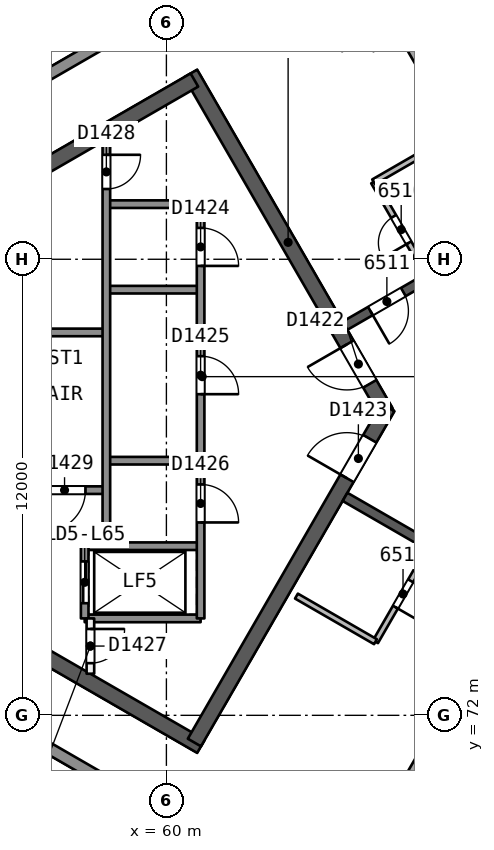
"""IFC4 building model, lengths in metres.
Left out: names, types, materials, properties, quantities, classifications, styles, units other than length and angle.
Written with IfcOpenShell. Run it as: python <this file> out.ifc"""

import sys

from ifc_helpers import new_model, si_unit, direction, frame, frame_2d, origin, place, context, subcontext, project, spatial, rectangle, extrude, element, fill, save


model = new_model("IFC4")
c1 = context("Model", 3, precision=1e-05, world=origin(), true_north=direction((0.0, 1.0)))
c2 = subcontext(c1, "Body", "Model", "MODEL_VIEW")
j1 = project(units=[si_unit("LENGTHUNIT", "METRE"), si_unit("PLANEANGLEUNIT", "RADIAN")], contexts=[c1])
p1 = place(None, origin())
s1 = spatial("IfcSite", under=j1, at=p1, CompositionType="ELEMENT")
p2 = place(p1, origin())
s2 = spatial("IfcBuilding", under=s1, at=p2, CompositionType="ELEMENT")
p3 = place(p2, frame((0.0, 0.0, 266.4)))
s3 = spatial("IfcBuildingStorey", under=s2, at=p3, CompositionType="ELEMENT", Elevation=266.4)
p4 = place(p3, frame((65.769, 80.0, 0.0), z_axis=(0.0, 0.0, 1.0), x_axis=(-0.50000177223, 0.866024380585, 0.0)))
e1 = element("IfcWall", 1, at=p4, inside=s3, PredefinedType="SHEAR", context=c2, shape_type="SweptSolid", body=[
    extrude(rectangle(XDim=10.265, YDim=0.4, at=frame_2d((5.132, 0.0))), origin(), (0.0, 0.0, 1.0), 3.7),
])
p5 = place(p4, frame((0.834, 0.0, 0.0)))
e2 = element("IfcOpeningElement", 2, at=p5, cuts=e1, PredefinedType="OPENING", context=c2, shape_type="SweptSolid", body=[
    extrude(rectangle(XDim=1.2, YDim=2.1, at=frame_2d((0.6, 1.05))), frame((0.0, 0.21, 0.0), z_axis=(0.0, -1.0, 0.0), x_axis=(1.0, 0.0, 0.0)), (0.0, 0.0, 1.0), 0.421),
])
p6 = place(p3, frame((60.737, 88.716, 0.0), z_axis=(0.0, 0.0, 1.0), x_axis=(-0.866028812667, -0.499994095595, 0.0)))
e3 = element("IfcWall", 3, at=p6, inside=s3, PredefinedType="SHEAR", context=c2, shape_type="SweptSolid", body=[
    extrude(rectangle(XDim=14.134, YDim=0.4, at=frame_2d((7.067, 0.0))), origin(), (0.0, 0.0, 1.0), 3.7),
])
p7 = place(p3, frame((48.597, 78.293, 0.0), z_axis=(0.0, 0.0, 1.0), x_axis=(0.866026024469, -0.499998924941, 0.0)))
e4 = element("IfcWall", 4, at=p7, inside=s3, PredefinedType="SHEAR", context=c2, shape_type="SweptSolid", body=[
    extrude(rectangle(XDim=14.218, YDim=0.4, at=frame_2d((7.109, 0.0))), origin(), (0.0, 0.0, 1.0), 3.7),
])
p8 = place(p3, frame((60.737, 71.284, 0.0), z_axis=(0.0, 0.0, 1.0), x_axis=(0.50000547566, 0.866022242388, 0.0)))
e5 = element("IfcWall", 5, at=p8, inside=s3, PredefinedType="SHEAR", context=c2, shape_type="SweptSolid", body=[
    extrude(rectangle(XDim=10.18, YDim=0.4, at=frame_2d((5.09, 0.0))), origin(), (0.0, 0.0, 1.0), 3.7),
])
p9 = place(p8, frame((8.03, 0.0, 0.0)))
e6 = element("IfcOpeningElement", 6, at=p9, cuts=e5, PredefinedType="OPENING", context=c2, shape_type="SweptSolid", body=[
    extrude(rectangle(XDim=1.2, YDim=2.1, at=frame_2d((0.6, 1.05))), frame((0.0, 0.21, 0.0), z_axis=(0.0, -1.0, 0.0), x_axis=(1.0, 0.0, 0.0)), (0.0, 0.0, 1.0), 0.421),
])
p10 = place(p3, frame((78.2, 90.046, 0.0), z_axis=(0.0, 0.0, 1.0), x_axis=(-0.866026492143, -0.499998114903, 0.0)))
e7 = element("IfcWall", 7, at=p10, inside=s3, PredefinedType="SHEAR", context=c2, shape_type="SweptSolid", body=[
    extrude(rectangle(XDim=15.588, YDim=0.25, at=frame_2d((7.794, 0.0))), origin(), (0.0, 0.0, 1.0), 3.3),
])
p11 = place(p10, frame((7.072, 0.0, 0.0)))
e8 = element("IfcOpeningElement", 8, at=p11, cuts=e7, PredefinedType="OPENING", context=c2, shape_type="SweptSolid", body=[
    extrude(rectangle(XDim=1.0, YDim=2.1, at=frame_2d((0.5, 1.05))), frame((0.0, 0.135, 0.0), z_axis=(0.0, -1.0, 0.0), x_axis=(1.0, 0.0, 0.0)), (0.0, 0.0, 1.0), 0.271),
])
p12 = place(p10, frame((13.816, 0.0, 0.0)))
e9 = element("IfcOpeningElement", 9, at=p12, cuts=e7, PredefinedType="OPENING", context=c2, shape_type="SweptSolid", body=[
    extrude(rectangle(XDim=1.0, YDim=2.1, at=frame_2d((0.5, 1.05))), frame((0.0, 0.135, 0.0), z_axis=(0.0, -1.0, 0.0), x_axis=(1.0, 0.0, 0.0)), (0.0, 0.0, 1.0), 0.271),
])
p13 = place(p3, frame((64.7, 77.748, 0.0), z_axis=(0.0, 0.0, 1.0), x_axis=(0.866026492143, -0.499998114903, 0.0)))
e10 = element("IfcWall", 10, at=p13, inside=s3, PredefinedType="SHEAR", context=c2, shape_type="SweptSolid", body=[
    extrude(rectangle(XDim=15.588, YDim=0.25, at=frame_2d((7.794, 0.0))), origin(), (0.0, 0.0, 1.0), 3.3),
])
p14 = place(p13, frame((3.372, 0.0, 0.0)))
e11 = element("IfcOpeningElement", 11, at=p14, cuts=e10, PredefinedType="OPENING", context=c2, shape_type="SweptSolid", body=[
    extrude(rectangle(XDim=1.0, YDim=2.1, at=frame_2d((0.5, 1.05))), frame((0.0, 0.135, 0.0), z_axis=(0.0, -1.0, 0.0), x_axis=(1.0, 0.0, 0.0)), (0.0, 0.0, 1.0), 0.271),
])
p15 = place(p13, frame((12.216, 0.0, 0.0)))
e12 = element("IfcOpeningElement", 12, at=p15, cuts=e10, PredefinedType="OPENING", context=c2, shape_type="SweptSolid", body=[
    extrude(rectangle(XDim=1.0, YDim=2.1, at=frame_2d((0.5, 1.05))), frame((0.0, 0.135, 0.0), z_axis=(0.0, -1.0, 0.0), x_axis=(1.0, 0.0, 0.0)), (0.0, 0.0, 1.0), 0.271),
])
p16 = place(p3, frame((64.416, 93.032, 0.0), z_axis=(0.0, 0.0, 1.0), x_axis=(0.500006360488, -0.866021731524, 0.0)))
e13 = element("IfcWall", 13, at=p16, inside=s3, PredefinedType="PARTITIONING", context=c2, shape_type="SweptSolid", body=[
    extrude(rectangle(XDim=9.479, YDim=0.2, at=frame_2d((4.739, 0.0))), origin(), (0.0, 0.0, 1.0), 3.3),
])
p17 = place(p3, frame((66.903, 83.524, 0.0), z_axis=(0.0, 0.0, 1.0), x_axis=(-0.499987231761, 0.866032775405, 0.0)))
e14 = element("IfcWall", 14, at=p17, inside=s3, PredefinedType="PARTITIONING", context=c2, shape_type="SweptSolid", body=[
    extrude(rectangle(XDim=2.9, YDim=0.15, at=frame_2d((1.45, 0.0))), origin(), (0.0, 0.0, 1.0), 3.3),
])
p18 = place(p17, frame((1.05, 0.0, 0.0)))
e15 = element("IfcOpeningElement", 15, at=p18, cuts=e14, PredefinedType="OPENING", context=c2, shape_type="SweptSolid", body=[
    extrude(rectangle(XDim=0.8, YDim=2.1, at=frame_2d((0.4, 1.05))), frame((0.0, 0.085, 0.0), z_axis=(0.0, -1.0, 0.0), x_axis=(1.0, 0.0, 0.0)), (0.0, 0.0, 1.0), 0.171),
])
p19 = place(p3, frame((65.453, 86.035, 0.0), z_axis=(0.0, 0.0, 1.0), x_axis=(0.866021400173, 0.500006934395, 0.0)))
e16 = element("IfcWall", 16, at=p19, inside=s3, PredefinedType="PARTITIONING", context=c2, shape_type="SweptSolid", body=[
    extrude(rectangle(XDim=2.6, YDim=0.15, at=frame_2d((1.3, 0.0))), origin(), (0.0, 0.0, 1.0), 3.3),
])
p20 = place(p3, frame((66.952, 76.448, 0.0), z_axis=(0.0, 0.0, 1.0), x_axis=(-0.499987231761, -0.866032775405, 0.0)))
e17 = element("IfcWall", 17, at=p20, inside=s3, PredefinedType="PARTITIONING", context=c2, shape_type="SweptSolid", body=[
    extrude(rectangle(XDim=2.9, YDim=0.15, at=frame_2d((1.45, 0.0))), origin(), (0.0, 0.0, 1.0), 3.3),
])
p21 = place(p20, frame((1.05, 0.0, 0.0)))
e18 = element("IfcOpeningElement", 18, at=p21, cuts=e17, PredefinedType="OPENING", context=c2, shape_type="SweptSolid", body=[
    extrude(rectangle(XDim=0.8, YDim=2.1, at=frame_2d((0.4, 1.05))), frame((0.0, 0.085, 0.0), z_axis=(0.0, -1.0, 0.0), x_axis=(1.0, 0.0, 0.0)), (0.0, 0.0, 1.0), 0.171),
])
p22 = place(p3, frame((65.502, 73.937, 0.0), z_axis=(0.0, 0.0, 1.0), x_axis=(-0.865994240961, 0.500053971709, 0.0)))
e19 = element("IfcWall", 19, at=p22, inside=s3, PredefinedType="PARTITIONING", context=c2, shape_type="SweptSolid", body=[
    extrude(rectangle(XDim=2.401, YDim=0.15, at=frame_2d((1.201, 0.0))), origin(), (0.0, 0.0, 1.0), 3.3),
])
p23 = place(p3, frame((64.416, 66.968, 0.0), z_axis=(0.0, 0.0, 1.0), x_axis=(0.500014792963, 0.866016862895, 0.0)))
e20 = element("IfcWall", 20, at=p23, inside=s3, PredefinedType="PARTITIONING", context=c2, shape_type="SweptSolid", body=[
    extrude(rectangle(XDim=6.578, YDim=0.2, at=frame_2d((3.289, 0.0))), origin(), (0.0, 0.0, 1.0), 3.3),
])
p24 = place(p3, frame((45.807, 82.46, 0.0), z_axis=(0.0, 0.0, 1.0), x_axis=(0.866024833565, 0.500000987648, 0.0)))
e21 = element("IfcWall", 21, at=p24, inside=s3, PredefinedType="SOLIDWALL", context=c2, shape_type="SweptSolid", body=[
    extrude(rectangle(XDim=48.104, YDim=0.3, at=frame_2d((24.052, 0.0))), origin(), (0.0, 0.0, 1.0), 3.3),
])
p25 = place(p24, frame((28.296, 0.0, 0.0)))
e22 = element("IfcOpeningElement", 22, at=p25, cuts=e21, PredefinedType="OPENING", context=c2, shape_type="SweptSolid", body=[
    extrude(rectangle(XDim=2.4, YDim=2.4, at=frame_2d((1.2, 1.2))), frame((0.0, 0.161, 0.0), z_axis=(0.0, -1.0, 0.0), x_axis=(1.0, 0.0, 0.0)), (0.0, 0.0, 1.0), 0.321),
])
p26 = place(p24, frame((23.074, 0.0, 0.0)))
e23 = element("IfcOpeningElement", 23, at=p26, cuts=e21, PredefinedType="OPENING", context=c2, shape_type="SweptSolid", body=[
    extrude(rectangle(XDim=2.4, YDim=2.4, at=frame_2d((1.2, 1.2))), frame((0.0, 0.161, 0.0), z_axis=(0.0, -1.0, 0.0), x_axis=(1.0, 0.0, 0.0)), (0.0, 0.0, 1.0), 0.321),
])
p27 = place(p24, frame((17.63, 0.0, 0.0)))
e24 = element("IfcOpeningElement", 24, at=p27, cuts=e21, PredefinedType="OPENING", context=c2, shape_type="SweptSolid", body=[
    extrude(rectangle(XDim=2.4, YDim=2.4, at=frame_2d((1.2, 1.2))), frame((0.0, 0.161, 0.0), z_axis=(0.0, -1.0, 0.0), x_axis=(1.0, 0.0, 0.0)), (0.0, 0.0, 1.0), 0.321),
])
p28 = place(p24, frame((39.118, 0.0, 0.9)))
e25 = element("IfcOpeningElement", 25, at=p28, cuts=e21, PredefinedType="OPENING", context=c2, shape_type="SweptSolid", body=[
    extrude(rectangle(XDim=1.8, YDim=1.5, at=frame_2d((0.9, 0.75))), frame((0.0, 0.161, 0.0), z_axis=(0.0, -1.0, 0.0), x_axis=(1.0, 0.0, 0.0)), (0.0, 0.0, 1.0), 0.321),
])
p29 = place(p3, frame((87.466, 53.488, 0.0), z_axis=(0.0, 0.0, 1.0), x_axis=(-0.866024833565, 0.500000987648, 0.0)))
e26 = element("IfcWall", 26, at=p29, inside=s3, PredefinedType="SOLIDWALL", context=c2, shape_type="SweptSolid", body=[
    extrude(rectangle(XDim=48.104, YDim=0.3, at=frame_2d((24.052, 0.0))), origin(), (0.0, 0.0, 1.0), 3.3),
])
p30 = place(p29, frame((23.152, 0.0, 0.0)))
e27 = element("IfcOpeningElement", 27, at=p30, cuts=e26, PredefinedType="OPENING", context=c2, shape_type="SweptSolid", body=[
    extrude(rectangle(XDim=2.4, YDim=2.4, at=frame_2d((1.2, 1.2))), frame((0.0, 0.161, 0.0), z_axis=(0.0, -1.0, 0.0), x_axis=(1.0, 0.0, 0.0)), (0.0, 0.0, 1.0), 0.321),
])
p31 = place(p29, frame((17.93, 0.0, 0.0)))
e28 = element("IfcOpeningElement", 28, at=p31, cuts=e26, PredefinedType="OPENING", context=c2, shape_type="SweptSolid", body=[
    extrude(rectangle(XDim=2.4, YDim=2.4, at=frame_2d((1.2, 1.2))), frame((0.0, 0.161, 0.0), z_axis=(0.0, -1.0, 0.0), x_axis=(1.0, 0.0, 0.0)), (0.0, 0.0, 1.0), 0.321),
])
p32 = place(p29, frame((28.074, 0.0, 0.0)))
e29 = element("IfcOpeningElement", 29, at=p32, cuts=e26, PredefinedType="OPENING", context=c2, shape_type="SweptSolid", body=[
    extrude(rectangle(XDim=2.4, YDim=2.4, at=frame_2d((1.2, 1.2))), frame((0.0, 0.161, 0.0), z_axis=(0.0, -1.0, 0.0), x_axis=(1.0, 0.0, 0.0)), (0.0, 0.0, 1.0), 0.321),
])
for number, where, z_axis, x_axis in (
    (30, (60.9, 85.45, 0.0), (0.0, 0.0, 1.0), (-1.0, 0.0, 0.0)),
    (31, (60.9, 83.2, 0.0), (0.0, 0.0, 1.0), (-1.0, 0.0, 0.0)),
):
    element("IfcWall", number, at=place(p3, frame(where, z_axis=z_axis, x_axis=x_axis)), inside=s3, PredefinedType="SOLIDWALL", context=c2, shape_type="SweptSolid", body=[
        extrude(rectangle(XDim=2.48, YDim=0.2, at=frame_2d((1.24, 0.0))), origin(), (0.0, 0.0, 1.0), 3.3),
    ])
p33 = place(p3, frame((58.42, 82.075, 0.0), z_axis=(0.0, 0.0, 1.0), x_axis=(-1.0, 0.0, 0.0)))
e32 = element("IfcWall", 32, at=p33, inside=s3, PredefinedType="SOLIDWALL", context=c2, shape_type="SweptSolid", body=[
    extrude(rectangle(XDim=7.7, YDim=0.2, at=frame_2d((3.85, 0.0))), origin(), (0.0, 0.0, 1.0), 3.3),
])
p34 = place(p3, frame((60.9, 78.7, 0.0), z_axis=(0.0, 0.0, 1.0), x_axis=(-1.0, 0.0, 0.0)))
e33 = element("IfcWall", 33, at=p34, inside=s3, PredefinedType="SOLIDWALL", context=c2, shape_type="SweptSolid", body=[
    extrude(rectangle(XDim=2.48, YDim=0.2, at=frame_2d((1.24, 0.0))), origin(), (0.0, 0.0, 1.0), 3.3),
])
p35 = place(p3, frame((58.42, 77.925, 0.0), z_axis=(0.0, 0.0, 1.0), x_axis=(-1.0, 0.0, 0.0)))
e34 = element("IfcWall", 34, at=p35, inside=s3, PredefinedType="SOLIDWALL", context=c2, shape_type="SweptSolid", body=[
    extrude(rectangle(XDim=7.7, YDim=0.2, at=frame_2d((3.85, 0.0))), origin(), (0.0, 0.0, 1.0), 3.3),
])
p36 = place(p35, frame((0.55, 0.0, 0.0)))
e35 = element("IfcOpeningElement", 35, at=p36, cuts=e34, PredefinedType="OPENING", context=c2, shape_type="SweptSolid", body=[
    extrude(rectangle(XDim=1.1, YDim=2.1, at=frame_2d((0.55, 1.05))), frame((0.0, 0.11, 0.0), z_axis=(0.0, -1.0, 0.0), x_axis=(1.0, 0.0, 0.0)), (0.0, 0.0, 1.0), 0.221),
])
for number, where, z_axis, x_axis in (
    (36, (60.9, 76.45, 0.0), (0.0, 0.0, 1.0), (-1.0, 0.0, 0.0)),
    (37, (60.9, 74.55, 0.0), (0.0, 0.0, 1.0), (-1.0, 0.0, 0.0)),
):
    element("IfcWall", number, at=place(p3, frame(where, z_axis=z_axis, x_axis=x_axis)), inside=s3, PredefinedType="SOLIDWALL", context=c2, shape_type="SweptSolid", body=[
        extrude(rectangle(XDim=3.05, YDim=0.2, at=frame_2d((1.525, 0.0))), origin(), (0.0, 0.0, 1.0), 3.3),
    ])
p37 = place(p3, frame((60.9, 85.45, 0.0), z_axis=(0.0, 0.0, 1.0), x_axis=(0.0, -1.0, 0.0)))
e38 = element("IfcWall", 38, at=p37, inside=s3, PredefinedType="SOLIDWALL", context=c2, shape_type="SweptSolid", body=[
    extrude(rectangle(XDim=10.9, YDim=0.2, at=frame_2d((5.45, 0.0))), origin(), (0.0, 0.0, 1.0), 3.3),
])
p38 = place(p37, frame((0.625, 0.0, 0.0)))
e39 = element("IfcOpeningElement", 39, at=p38, cuts=e38, PredefinedType="OPENING", context=c2, shape_type="SweptSolid", body=[
    extrude(rectangle(XDim=1.0, YDim=2.1, at=frame_2d((0.5, 1.05))), frame((0.0, 0.11, 0.0), z_axis=(0.0, -1.0, 0.0), x_axis=(1.0, 0.0, 0.0)), (0.0, 0.0, 1.0), 0.221),
])
p39 = place(p37, frame((4.0, 0.0, 0.0)))
e40 = element("IfcOpeningElement", 40, at=p39, cuts=e38, PredefinedType="OPENING", context=c2, shape_type="SweptSolid", body=[
    extrude(rectangle(XDim=1.0, YDim=2.1, at=frame_2d((0.5, 1.05))), frame((0.0, 0.11, 0.0), z_axis=(0.0, -1.0, 0.0), x_axis=(1.0, 0.0, 0.0)), (0.0, 0.0, 1.0), 0.221),
])
p40 = place(p37, frame((7.375, 0.0, 0.0)))
e41 = element("IfcOpeningElement", 41, at=p40, cuts=e38, PredefinedType="OPENING", context=c2, shape_type="SweptSolid", body=[
    extrude(rectangle(XDim=1.0, YDim=2.1, at=frame_2d((0.5, 1.05))), frame((0.0, 0.11, 0.0), z_axis=(0.0, -1.0, 0.0), x_axis=(1.0, 0.0, 0.0)), (0.0, 0.0, 1.0), 0.221),
])
p41 = place(p3, frame((58.42, 87.148, 0.0), z_axis=(0.0, 0.0, 1.0), x_axis=(0.0, -1.0, 0.0)))
e42 = element("IfcWall", 42, at=p41, inside=s3, PredefinedType="SOLIDWALL", context=c2, shape_type="SweptSolid", body=[
    extrude(rectangle(XDim=10.698, YDim=0.2, at=frame_2d((5.349, 0.0))), origin(), (0.0, 0.0, 1.0), 3.3),
])
p42 = place(p41, frame((0.399, 0.0, 0.0)))
e43 = element("IfcOpeningElement", 43, at=p42, cuts=e42, PredefinedType="OPENING", context=c2, shape_type="SweptSolid", body=[
    extrude(rectangle(XDim=0.9, YDim=2.1, at=frame_2d((0.45, 1.05))), frame((0.0, 0.11, 0.0), z_axis=(0.0, -1.0, 0.0), x_axis=(1.0, 0.0, 0.0)), (0.0, 0.0, 1.0), 0.221),
])
p43 = place(p3, frame((58.0, 74.55, 0.0), z_axis=(0.0, 0.0, 1.0), x_axis=(0.0, -1.0, 0.0)))
e44 = element("IfcWall", 44, at=p43, inside=s3, PredefinedType="PARTITIONING", context=c2, shape_type="SweptSolid", body=[
    extrude(rectangle(XDim=1.455, YDim=0.2, at=frame_2d((0.728, 0.0))), origin(), (0.0, 0.0, 1.0), 3.3),
])
p44 = place(p43, frame((0.278, 0.0, 0.0)))
e45 = element("IfcOpeningElement", 45, at=p44, cuts=e44, PredefinedType="OPENING", context=c2, shape_type="SweptSolid", body=[
    extrude(rectangle(XDim=0.9, YDim=2.1, at=frame_2d((0.45, 1.05))), frame((0.0, 0.11, 0.0), z_axis=(0.0, -1.0, 0.0), x_axis=(1.0, 0.0, 0.0)), (0.0, 0.0, 1.0), 0.221),
])
p45 = place(p3, frame((57.85, 76.45, 0.0), z_axis=(0.0, 0.0, 1.0), x_axis=(0.0, -1.0, 0.0)))
e46 = element("IfcWall", 46, at=p45, inside=s3, PredefinedType="SOLIDWALL", context=c2, shape_type="SweptSolid", body=[
    extrude(rectangle(XDim=1.9, YDim=0.2, at=frame_2d((0.95, 0.0))), origin(), (0.0, 0.0, 1.0), 3.3),
])
p46 = place(p45, frame((0.4, 0.0, 0.0)))
e47 = element("IfcOpeningElement", 47, at=p46, cuts=e46, PredefinedType="OPENING", context=c2, shape_type="SweptSolid", body=[
    extrude(rectangle(XDim=1.1, YDim=2.1, at=frame_2d((0.55, 1.05))), frame((0.0, 0.11, 0.0), z_axis=(0.0, -1.0, 0.0), x_axis=(1.0, 0.0, 0.0)), (0.0, 0.0, 1.0), 0.221),
])
p47 = place(p18, origin())
e48 = element("IfcDoor", 48, at=p47, inside=s3, OperationType="SINGLE_SWING_LEFT", PredefinedType="NOTDEFINED", context=c2, shape_type="SweptSolid", body=[
    extrude(rectangle(XDim=0.8, YDim=2.1, at=frame_2d((0.4, 1.05))), frame((0.0, 0.025, 0.0), z_axis=(0.0, -1.0, 0.0), x_axis=(1.0, 0.0, 0.0)), (0.0, 0.0, 1.0), 0.05),
])
fill(e15, e48)
p48 = place(p12, origin())
e49 = element("IfcDoor", 49, at=p48, inside=s3, OperationType="SINGLE_SWING_RIGHT", PredefinedType="NOTDEFINED", context=c2, shape_type="SweptSolid", body=[
    extrude(rectangle(XDim=1.0, YDim=2.1, at=frame_2d((0.5, 1.05))), frame((0.0, 0.025, 0.0), z_axis=(0.0, -1.0, 0.0), x_axis=(1.0, 0.0, 0.0)), (0.0, 0.0, 1.0), 0.05),
])
fill(e9, e49)
p49 = place(p21, origin())
e50 = element("IfcDoor", 50, at=p49, inside=s3, OperationType="SINGLE_SWING_RIGHT", PredefinedType="NOTDEFINED", context=c2, shape_type="SweptSolid", body=[
    extrude(rectangle(XDim=0.8, YDim=2.1, at=frame_2d((0.4, 1.05))), frame((0.0, 0.025, 0.0), z_axis=(0.0, -1.0, 0.0), x_axis=(1.0, 0.0, 0.0)), (0.0, 0.0, 1.0), 0.05),
])
fill(e18, e50)
p50 = place(p5, origin())
e51 = element("IfcDoor", 51, at=p50, inside=s3, OperationType="SINGLE_SWING_RIGHT", PredefinedType="NOTDEFINED", context=c2, shape_type="SweptSolid", body=[
    extrude(rectangle(XDim=1.2, YDim=2.1, at=frame_2d((0.6, 1.05))), frame((0.0, 0.025, 0.0), z_axis=(0.0, -1.0, 0.0), x_axis=(1.0, 0.0, 0.0)), (0.0, 0.0, 1.0), 0.05),
])
fill(e2, e51)
p51 = place(p9, origin())
e52 = element("IfcDoor", 52, at=p51, inside=s3, OperationType="SINGLE_SWING_LEFT", PredefinedType="NOTDEFINED", context=c2, shape_type="SweptSolid", body=[
    extrude(rectangle(XDim=1.2, YDim=2.1, at=frame_2d((0.6, 1.05))), frame((0.0, 0.025, 0.0), z_axis=(0.0, -1.0, 0.0), x_axis=(1.0, 0.0, 0.0)), (0.0, 0.0, 1.0), 0.05),
])
fill(e6, e52)
p52 = place(p46, origin())
e53 = element("IfcDoor", 53, at=p52, inside=s3, OperationType="SLIDING_TO_RIGHT", PredefinedType="NOTDEFINED", context=c2, shape_type="SweptSolid", body=[
    extrude(rectangle(XDim=1.1, YDim=2.1, at=frame_2d((0.55, 1.05))), frame((0.0, 0.025, 0.0), z_axis=(0.0, -1.0, 0.0), x_axis=(1.0, 0.0, 0.0)), (0.0, 0.0, 1.0), 0.05),
])
fill(e47, e53)
p53 = place(p38, origin())
e54 = element("IfcDoor", 54, at=p53, inside=s3, OperationType="SINGLE_SWING_RIGHT", PredefinedType="NOTDEFINED", context=c2, shape_type="SweptSolid", body=[
    extrude(rectangle(XDim=1.0, YDim=2.1, at=frame_2d((0.5, 1.05))), frame((0.0, 0.025, 0.0), z_axis=(0.0, -1.0, 0.0), x_axis=(1.0, 0.0, 0.0)), (0.0, 0.0, 1.0), 0.05),
])
fill(e39, e54)
p54 = place(p39, origin())
e55 = element("IfcDoor", 55, at=p54, inside=s3, OperationType="SINGLE_SWING_RIGHT", PredefinedType="NOTDEFINED", context=c2, shape_type="SweptSolid", body=[
    extrude(rectangle(XDim=1.0, YDim=2.1, at=frame_2d((0.5, 1.05))), frame((0.0, 0.025, 0.0), z_axis=(0.0, -1.0, 0.0), x_axis=(1.0, 0.0, 0.0)), (0.0, 0.0, 1.0), 0.05),
])
fill(e40, e55)
p55 = place(p40, origin())
e56 = element("IfcDoor", 56, at=p55, inside=s3, OperationType="SINGLE_SWING_RIGHT", PredefinedType="NOTDEFINED", context=c2, shape_type="SweptSolid", body=[
    extrude(rectangle(XDim=1.0, YDim=2.1, at=frame_2d((0.5, 1.05))), frame((0.0, 0.025, 0.0), z_axis=(0.0, -1.0, 0.0), x_axis=(1.0, 0.0, 0.0)), (0.0, 0.0, 1.0), 0.05),
])
fill(e41, e56)
p56 = place(p44, origin())
e57 = element("IfcDoor", 57, at=p56, inside=s3, OperationType="SINGLE_SWING_LEFT", PredefinedType="NOTDEFINED", context=c2, shape_type="SweptSolid", body=[
    extrude(rectangle(XDim=0.9, YDim=2.1, at=frame_2d((0.45, 1.05))), frame((0.0, 0.025, 0.0), z_axis=(0.0, -1.0, 0.0), x_axis=(1.0, 0.0, 0.0)), (0.0, 0.0, 1.0), 0.05),
])
fill(e45, e57)
p57 = place(p42, origin())
e58 = element("IfcDoor", 58, at=p57, inside=s3, OperationType="SINGLE_SWING_LEFT", PredefinedType="NOTDEFINED", context=c2, shape_type="SweptSolid", body=[
    extrude(rectangle(XDim=0.9, YDim=2.1, at=frame_2d((0.45, 1.05))), frame((0.0, 0.025, 0.0), z_axis=(0.0, -1.0, 0.0), x_axis=(1.0, 0.0, 0.0)), (0.0, 0.0, 1.0), 0.05),
])
fill(e43, e58)
p58 = place(p36, origin())
e59 = element("IfcDoor", 59, at=p58, inside=s3, OperationType="SINGLE_SWING_RIGHT", PredefinedType="NOTDEFINED", context=c2, shape_type="SweptSolid", body=[
    extrude(rectangle(XDim=1.1, YDim=2.1, at=frame_2d((0.55, 1.05))), frame((0.0, 0.025, 0.0), z_axis=(0.0, -1.0, 0.0), x_axis=(1.0, 0.0, 0.0)), (0.0, 0.0, 1.0), 0.05),
])
fill(e35, e59)
save(model, sys.argv[1])
